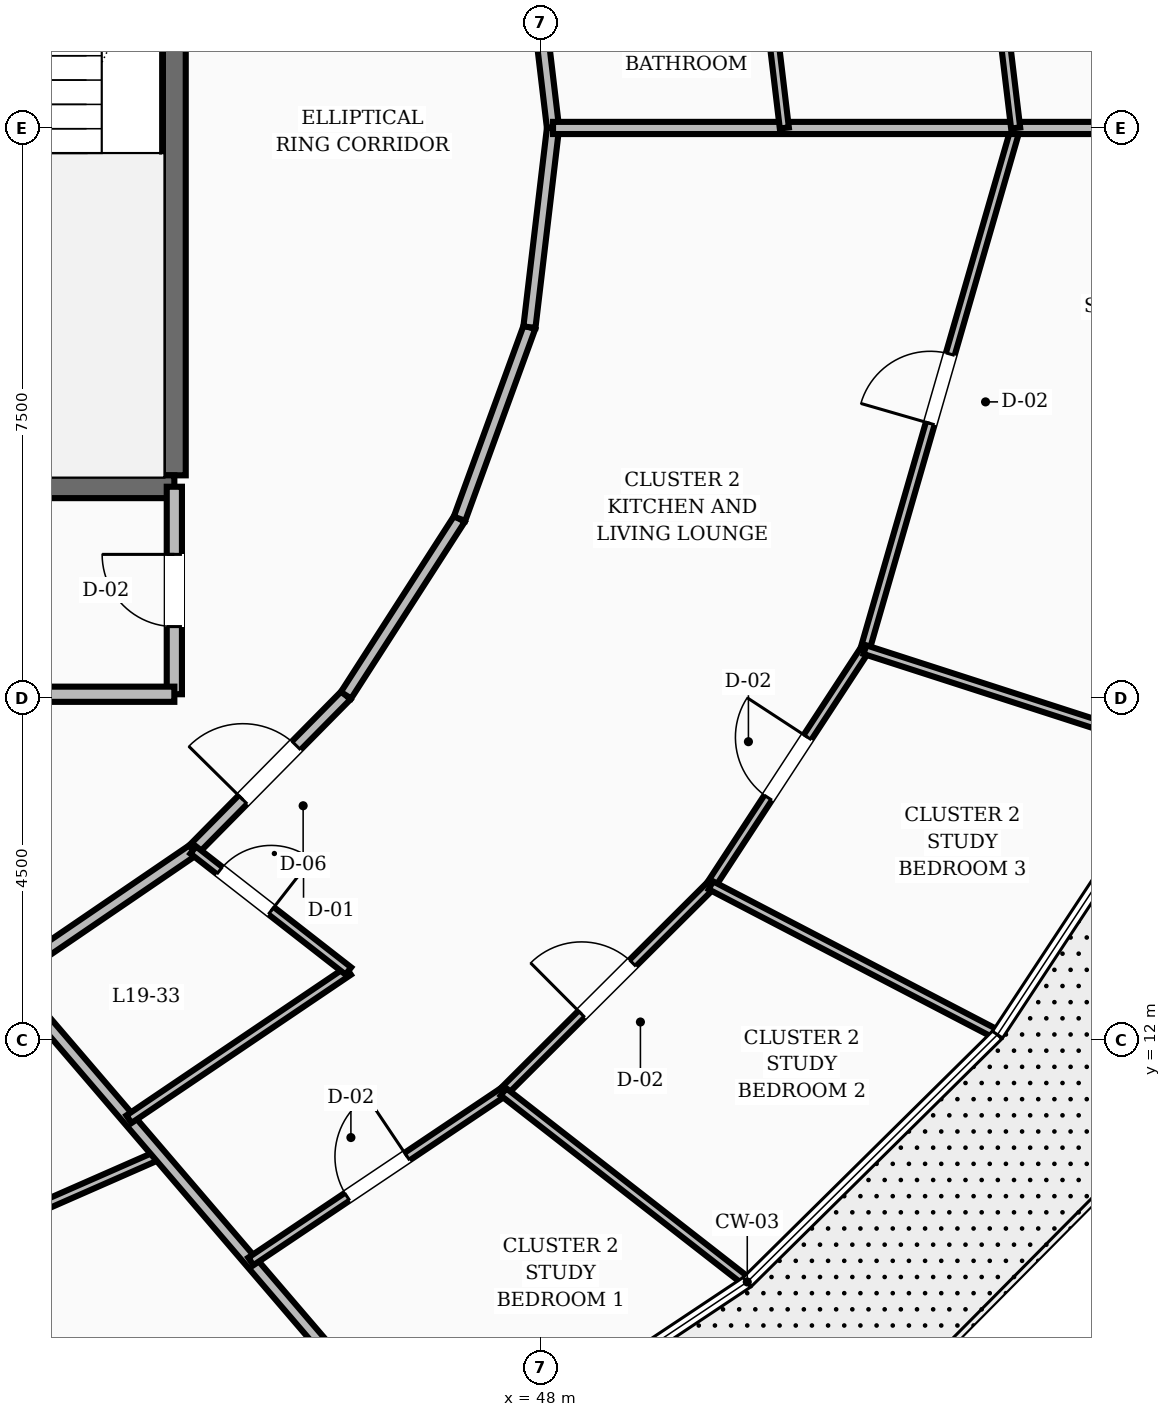
"""IFC4 building model, lengths in metres.
Left out: names, types, materials, properties, quantities, classifications, styles, units other than length and angle.
Written with IfcOpenShell. Run it as: python <this file> out.ifc"""

import sys

from ifc_helpers import new_model, si_unit, direction, frame, frame_2d, origin, place, context, subcontext, project, spatial, rectangle, extrude, element, fill, save


model = new_model("IFC4")
c1 = context("Model", 3, precision=1e-05, world=origin(), true_north=direction((0.0, 1.0)))
c2 = subcontext(c1, "Body", "Model", "MODEL_VIEW")
j1 = project(units=[si_unit("LENGTHUNIT", "METRE"), si_unit("PLANEANGLEUNIT", "RADIAN")], contexts=[c1])
p1 = place(None, origin())
s1 = spatial("IfcSite", under=j1, at=p1, CompositionType="ELEMENT")
p2 = place(p1, origin())
s2 = spatial("IfcBuilding", under=s1, at=p2, CompositionType="ELEMENT")
p3 = place(p2, frame((0.0, 0.0, 77.2)))
s3 = spatial("IfcBuildingStorey", under=s2, at=p3, CompositionType="ELEMENT", Elevation=77.2)
p4 = place(p3, frame((43.18, 19.43, 0.0), z_axis=(0.0, 0.0, 1.0), x_axis=(0.0, 1.0, 0.0)))
e1 = element("IfcWall", 1, at=p4, inside=s3, PredefinedType="SHEAR", context=c2, shape_type="SweptSolid", body=[
    extrude(rectangle(XDim=8.74, YDim=0.3, at=frame_2d((4.37, 0.0))), origin(), (0.0, 0.0, 1.0), 3.6),
])
p5 = place(p3, frame((39.58, 19.28, 0.0), z_axis=(0.0, 0.0, 1.0), x_axis=(1.0, 0.0, 0.0)))
e2 = element("IfcWall", 2, at=p5, inside=s3, PredefinedType="SHEAR", context=c2, shape_type="SweptSolid", body=[
    extrude(rectangle(XDim=3.6, YDim=0.3, at=frame_2d((1.8, 0.0))), origin(), (0.0, 0.0, 1.0), 3.6),
])
p6 = place(p3, frame((43.18, 16.55, 0.0), z_axis=(0.0, 0.0, 1.0), x_axis=(0.0, 1.0, 0.0)))
e3 = element("IfcWall", 3, at=p6, inside=s3, PredefinedType="SOLIDWALL", context=c2, shape_type="SweptSolid", body=[
    extrude(rectangle(XDim=2.73, YDim=0.2, at=frame_2d((1.365, 0.0))), origin(), (0.0, 0.0, 1.0), 2.71),
])
p7 = place(p6, frame((0.89, 0.0, 0.0)))
e4 = element("IfcOpeningElement", 4, at=p7, cuts=e3, PredefinedType="OPENING", context=c2, shape_type="SweptSolid", body=[
    extrude(rectangle(XDim=0.95, YDim=2.1, at=frame_2d((0.475, 1.05))), frame((0.0, 0.11, 0.0), z_axis=(0.0, -1.0, 0.0), x_axis=(1.0, 0.0, 0.0)), (0.0, 0.0, 1.0), 0.22),
])
p8 = place(p3, frame((39.2, 16.55, 0.0), z_axis=(0.0, 0.0, 1.0), x_axis=(1.0, 0.0, 0.0)))
e5 = element("IfcWall", 5, at=p8, inside=s3, PredefinedType="SOLIDWALL", context=c2, shape_type="SweptSolid", body=[
    extrude(rectangle(XDim=3.98, YDim=0.2, at=frame_2d((1.99, 0.0))), origin(), (0.0, 0.0, 1.0), 2.71),
])
p9 = place(p3, frame((48.162, 24.0, 0.0), z_axis=(0.0, 0.0, 1.0), x_axis=(-0.117667763342, 0.993053018459, 0.0)))
e6 = element("IfcWall", 6, at=p9, inside=s3, PredefinedType="SOLIDWALL", context=c2, shape_type="SweptSolid", body=[
    extrude(rectangle(XDim=2.639, YDim=0.16, at=frame_2d((1.32, 0.0))), origin(), (0.0, 0.0, 1.0), 2.71),
])
p10 = place(p3, frame((40.979, 12.83, 0.0), z_axis=(0.0, 0.0, 1.0), x_axis=(0.826112340767, 0.563505457323, 0.0)))
e7 = element("IfcWall", 7, at=p10, inside=s3, PredefinedType="SOLIDWALL", context=c2, shape_type="SweptSolid", body=[
    extrude(rectangle(XDim=2.965, YDim=0.16, at=frame_2d((1.482, 0.0))), origin(), (0.0, 0.0, 1.0), 2.71),
])
p11 = place(p3, frame((43.428, 14.501, 0.0), z_axis=(0.0, 0.0, 1.0), x_axis=(0.702569520063, 0.711615113301, 0.0)))
e8 = element("IfcWall", 8, at=p11, inside=s3, PredefinedType="SOLIDWALL", context=c2, shape_type="SweptSolid", body=[
    extrude(rectangle(XDim=2.861, YDim=0.16, at=frame_2d((1.43, 0.0))), origin(), (0.0, 0.0, 1.0), 2.71),
])
p12 = place(p11, frame((0.93, 0.0, 0.0)))
e9 = element("IfcOpeningElement", 9, at=p12, cuts=e8, PredefinedType="OPENING", context=c2, shape_type="SweptSolid", body=[
    extrude(rectangle(XDim=1.0, YDim=2.1, at=frame_2d((0.5, 1.05))), frame((0.0, 0.09, 0.0), z_axis=(0.0, -1.0, 0.0), x_axis=(1.0, 0.0, 0.0)), (0.0, 0.0, 1.0), 0.18),
])
p13 = place(p3, frame((45.438, 16.537, 0.0), z_axis=(0.0, 0.0, 1.0), x_axis=(0.540891657444, 0.841092274907, 0.0)))
e10 = element("IfcWall", 10, at=p13, inside=s3, PredefinedType="SOLIDWALL", context=c2, shape_type="SweptSolid", body=[
    extrude(rectangle(XDim=2.761, YDim=0.16, at=frame_2d((1.38, 0.0))), origin(), (0.0, 0.0, 1.0), 2.71),
])
p14 = place(p3, frame((46.932, 18.859, 0.0), z_axis=(0.0, 0.0, 1.0), x_axis=(0.342882618672, 0.939378257047, 0.0)))
e11 = element("IfcWall", 11, at=p14, inside=s3, PredefinedType="SOLIDWALL", context=c2, shape_type="SweptSolid", body=[
    extrude(rectangle(XDim=2.683, YDim=0.16, at=frame_2d((1.341, 0.0))), origin(), (0.0, 0.0, 1.0), 2.71),
])
p15 = place(p3, frame((47.852, 21.379, 0.0), z_axis=(0.0, 0.0, 1.0), x_axis=(0.117667763342, 0.993053018459, 0.0)))
e12 = element("IfcWall", 12, at=p15, inside=s3, PredefinedType="SOLIDWALL", context=c2, shape_type="SweptSolid", body=[
    extrude(rectangle(XDim=2.639, YDim=0.16, at=frame_2d((1.32, 0.0))), origin(), (0.0, 0.0, 1.0), 2.71),
])
p16 = place(p3, frame((39.566, 8.99, 0.0), z_axis=(0.0, 0.0, 1.0), x_axis=(0.915580022578, 0.402135825631, 0.0)))
e13 = element("IfcWall", 13, at=p16, inside=s3, PredefinedType="PARTITIONING", context=c2, shape_type="SweptSolid", body=[
    extrude(rectangle(XDim=3.733, YDim=0.12, at=frame_2d((1.867, 0.0))), origin(), (0.0, 0.0, 1.0), 2.71),
])
p17 = place(p3, frame((40.979, 12.83, 0.0), z_axis=(0.0, 0.0, 1.0), x_axis=(0.650772992722, -0.759272356894, 0.0)))
e14 = element("IfcWall", 14, at=p17, inside=s3, PredefinedType="SOLIDWALL", context=c2, shape_type="SweptSolid", body=[
    extrude(rectangle(XDim=8.751, YDim=0.16, at=frame_2d((4.375, 0.0))), origin(), (0.0, 0.0, 1.0), 2.71),
])
p18 = place(p3, frame((42.583, 10.959, 0.0), z_axis=(0.0, 0.0, 1.0), x_axis=(0.828573152584, 0.559880818404, 0.0)))
e15 = element("IfcWall", 15, at=p18, inside=s3, PredefinedType="PARTITIONING", context=c2, shape_type="SweptSolid", body=[
    extrude(rectangle(XDim=3.484, YDim=0.12, at=frame_2d((1.742, 0.0))), origin(), (0.0, 0.0, 1.0), 2.71),
])
p19 = place(p3, frame((43.428, 14.501, 0.0), z_axis=(0.0, 0.0, 1.0), x_axis=(0.788630382034, -0.614867563409, 0.0)))
e16 = element("IfcWall", 16, at=p19, inside=s3, PredefinedType="PARTITIONING", context=c2, shape_type="SweptSolid", body=[
    extrude(rectangle(XDim=2.588, YDim=0.12, at=frame_2d((1.294, 0.0))), origin(), (0.0, 0.0, 1.0), 2.71),
])
p20 = place(p19, frame((0.44, 0.0, 0.0)))
e17 = element("IfcOpeningElement", 17, at=p20, cuts=e16, PredefinedType="OPENING", context=c2, shape_type="SweptSolid", body=[
    extrude(rectangle(XDim=0.86, YDim=2.1, at=frame_2d((0.43, 1.05))), frame((0.0, 0.07, 0.0), z_axis=(0.0, -1.0, 0.0), x_axis=(1.0, 0.0, 0.0)), (0.0, 0.0, 1.0), 0.14),
])
p21 = place(p3, frame((44.186, 9.088, 0.0), z_axis=(0.0, 0.0, 1.0), x_axis=(0.83037634004, 0.557202955755, 0.0)))
e18 = element("IfcWall", 18, at=p21, inside=s3, PredefinedType="PARTITIONING", context=c2, shape_type="SweptSolid", body=[
    extrude(rectangle(XDim=4.003, YDim=0.12, at=frame_2d((2.001, 0.0))), origin(), (0.0, 0.0, 1.0), 2.71),
])
p22 = place(p21, frame((1.527, 0.0, 0.0)))
e19 = element("IfcOpeningElement", 19, at=p22, cuts=e18, PredefinedType="OPENING", context=c2, shape_type="SweptSolid", body=[
    extrude(rectangle(XDim=0.95, YDim=2.1, at=frame_2d((0.475, 1.05))), frame((0.0, 0.07, 0.0), z_axis=(0.0, -1.0, 0.0), x_axis=(1.0, 0.0, 0.0)), (0.0, 0.0, 1.0), 0.14),
])
p23 = place(p3, frame((47.51, 11.318, 0.0), z_axis=(0.0, 0.0, 1.0), x_axis=(0.708405354772, 0.70580581843, 0.0)))
e20 = element("IfcWall", 20, at=p23, inside=s3, PredefinedType="PARTITIONING", context=c2, shape_type="SweptSolid", body=[
    extrude(rectangle(XDim=3.851, YDim=0.12, at=frame_2d((1.925, 0.0))), origin(), (0.0, 0.0, 1.0), 2.71),
])
p24 = place(p23, frame((1.45, 0.0, 0.0)))
e21 = element("IfcOpeningElement", 21, at=p24, cuts=e20, PredefinedType="OPENING", context=c2, shape_type="SweptSolid", body=[
    extrude(rectangle(XDim=0.95, YDim=2.1, at=frame_2d((0.475, 1.05))), frame((0.0, 0.07, 0.0), z_axis=(0.0, -1.0, 0.0), x_axis=(1.0, 0.0, 0.0)), (0.0, 0.0, 1.0), 0.14),
])
p25 = place(p3, frame((47.51, 11.318, 0.0), z_axis=(0.0, 0.0, 1.0), x_axis=(0.788634929873, -0.614861730297, 0.0)))
e22 = element("IfcWall", 22, at=p25, inside=s3, PredefinedType="PARTITIONING", context=c2, shape_type="SweptSolid", body=[
    extrude(rectangle(XDim=4.017, YDim=0.12, at=frame_2d((2.008, 0.0))), origin(), (0.0, 0.0, 1.0), 2.71),
])
p26 = place(p3, frame((50.238, 14.036, 0.0), z_axis=(0.0, 0.0, 1.0), x_axis=(0.547210297377, 0.836995155568, 0.0)))
e23 = element("IfcWall", 23, at=p26, inside=s3, PredefinedType="PARTITIONING", context=c2, shape_type="SweptSolid", body=[
    extrude(rectangle(XDim=3.704, YDim=0.12, at=frame_2d((1.852, 0.0))), origin(), (0.0, 0.0, 1.0), 2.71),
])
p27 = place(p26, frame((1.377, 0.0, 0.0)))
e24 = element("IfcOpeningElement", 24, at=p27, cuts=e23, PredefinedType="OPENING", context=c2, shape_type="SweptSolid", body=[
    extrude(rectangle(XDim=0.95, YDim=2.1, at=frame_2d((0.475, 1.05))), frame((0.0, 0.07, 0.0), z_axis=(0.0, -1.0, 0.0), x_axis=(1.0, 0.0, 0.0)), (0.0, 0.0, 1.0), 0.14),
])
p28 = place(p3, frame((50.238, 14.036, 0.0), z_axis=(0.0, 0.0, 1.0), x_axis=(0.886891273175, -0.461978213303, 0.0)))
e25 = element("IfcWall", 25, at=p28, inside=s3, PredefinedType="PARTITIONING", context=c2, shape_type="SweptSolid", body=[
    extrude(rectangle(XDim=4.202, YDim=0.12, at=frame_2d((2.101, 0.0))), origin(), (0.0, 0.0, 1.0), 2.71),
])
p29 = place(p3, frame((52.265, 17.137, 0.0), z_axis=(0.0, 0.0, 1.0), x_axis=(0.277595025379, 0.960698184595, 0.0)))
e26 = element("IfcWall", 26, at=p29, inside=s3, PredefinedType="PARTITIONING", context=c2, shape_type="SweptSolid", body=[
    extrude(rectangle(XDim=7.144, YDim=0.12, at=frame_2d((3.572, 0.0))), origin(), (0.0, 0.0, 1.0), 2.71),
])
p30 = place(p29, frame((3.097, 0.0, 0.0)))
e27 = element("IfcOpeningElement", 27, at=p30, cuts=e26, PredefinedType="OPENING", context=c2, shape_type="SweptSolid", body=[
    extrude(rectangle(XDim=0.95, YDim=2.1, at=frame_2d((0.475, 1.05))), frame((0.0, 0.07, 0.0), z_axis=(0.0, -1.0, 0.0), x_axis=(1.0, 0.0, 0.0)), (0.0, 0.0, 1.0), 0.14),
])
p31 = place(p3, frame((52.265, 17.137, 0.0), z_axis=(0.0, 0.0, 1.0), x_axis=(0.951624541118, -0.307263295467, 0.0)))
e28 = element("IfcWall", 28, at=p31, inside=s3, PredefinedType="PARTITIONING", context=c2, shape_type="SweptSolid", body=[
    extrude(rectangle(XDim=4.354, YDim=0.12, at=frame_2d((2.177, 0.0))), origin(), (0.0, 0.0, 1.0), 2.71),
])
p32 = place(p3, frame((48.162, 24.0, 0.0), z_axis=(0.0, 0.0, 1.0), x_axis=(1.0, 0.0, 0.0)))
e29 = element("IfcWall", 29, at=p32, inside=s3, PredefinedType="SOLIDWALL", context=c2, shape_type="SweptSolid", body=[
    extrude(rectangle(XDim=10.819, YDim=0.16, at=frame_2d((5.409, 0.0))), origin(), (0.0, 0.0, 1.0), 2.71),
])
p33 = place(p3, frame((51.205, 24.0, 0.0), z_axis=(0.0, 0.0, 1.0), x_axis=(-0.118529643461, 0.992950514185, 0.0)))
e30 = element("IfcWall", 30, at=p33, inside=s3, PredefinedType="PARTITIONING", context=c2, shape_type="SweptSolid", body=[
    extrude(rectangle(XDim=3.112, YDim=0.12, at=frame_2d((1.556, 0.0))), origin(), (0.0, 0.0, 1.0), 2.71),
])
p34 = place(p3, frame((54.248, 24.0, 0.0), z_axis=(0.0, 0.0, 1.0), x_axis=(-0.119223081784, 0.99286749205, 0.0)))
e31 = element("IfcWall", 31, at=p34, inside=s3, PredefinedType="PARTITIONING", context=c2, shape_type="SweptSolid", body=[
    extrude(rectangle(XDim=3.586, YDim=0.12, at=frame_2d((1.793, 0.0))), origin(), (0.0, 0.0, 1.0), 2.71),
])
p35 = place(p34, frame((1.318, 0.0, 0.0)))
e32 = element("IfcOpeningElement", 32, at=p35, cuts=e31, PredefinedType="OPENING", context=c2, shape_type="SweptSolid", body=[
    extrude(rectangle(XDim=0.95, YDim=2.1, at=frame_2d((0.475, 1.05))), frame((0.0, 0.07, 0.0), z_axis=(0.0, -1.0, 0.0), x_axis=(1.0, 0.0, 0.0)), (0.0, 0.0, 1.0), 0.14),
])
p36 = place(p7, origin())
e33 = element("IfcDoor", 33, at=p36, inside=s3, OperationType="SINGLE_SWING_RIGHT", PredefinedType="DOOR", context=c2, shape_type="SweptSolid", body=[
    extrude(rectangle(XDim=0.95, YDim=2.1, at=frame_2d((0.475, 1.05))), frame((0.0, 0.025, 0.0), z_axis=(0.0, -1.0, 0.0), x_axis=(1.0, 0.0, 0.0)), (0.0, 0.0, 1.0), 0.05),
])
fill(e4, e33)
p37 = place(p20, origin())
e34 = element("IfcDoor", 34, at=p37, inside=s3, OperationType="SINGLE_SWING_RIGHT", PredefinedType="DOOR", context=c2, shape_type="SweptSolid", body=[
    extrude(rectangle(XDim=0.86, YDim=2.1, at=frame_2d((0.43, 1.05))), frame((0.0, 0.025, 0.0), z_axis=(0.0, -1.0, 0.0), x_axis=(1.0, 0.0, 0.0)), (0.0, 0.0, 1.0), 0.05),
])
fill(e17, e34)
p38 = place(p12, origin())
e35 = element("IfcDoor", 35, at=p38, inside=s3, OperationType="SINGLE_SWING_LEFT", PredefinedType="DOOR", context=c2, shape_type="SweptSolid", body=[
    extrude(rectangle(XDim=1.0, YDim=2.1, at=frame_2d((0.5, 1.05))), frame((0.0, 0.025, 0.0), z_axis=(0.0, -1.0, 0.0), x_axis=(1.0, 0.0, 0.0)), (0.0, 0.0, 1.0), 0.05),
])
fill(e9, e35)
p39 = place(p22, origin())
e36 = element("IfcDoor", 36, at=p39, inside=s3, OperationType="SINGLE_SWING_RIGHT", PredefinedType="DOOR", context=c2, shape_type="SweptSolid", body=[
    extrude(rectangle(XDim=0.95, YDim=2.1, at=frame_2d((0.475, 1.05))), frame((0.0, 0.025, 0.0), z_axis=(0.0, -1.0, 0.0), x_axis=(1.0, 0.0, 0.0)), (0.0, 0.0, 1.0), 0.05),
])
fill(e19, e36)
p40 = place(p24, origin())
e37 = element("IfcDoor", 37, at=p40, inside=s3, OperationType="SINGLE_SWING_LEFT", PredefinedType="DOOR", context=c2, shape_type="SweptSolid", body=[
    extrude(rectangle(XDim=0.95, YDim=2.1, at=frame_2d((0.475, 1.05))), frame((0.0, 0.025, 0.0), z_axis=(0.0, -1.0, 0.0), x_axis=(1.0, 0.0, 0.0)), (0.0, 0.0, 1.0), 0.05),
])
fill(e21, e37)
p41 = place(p27, origin())
e38 = element("IfcDoor", 38, at=p41, inside=s3, OperationType="SINGLE_SWING_RIGHT", PredefinedType="DOOR", context=c2, shape_type="SweptSolid", body=[
    extrude(rectangle(XDim=0.95, YDim=2.1, at=frame_2d((0.475, 1.05))), frame((0.0, 0.025, 0.0), z_axis=(0.0, -1.0, 0.0), x_axis=(1.0, 0.0, 0.0)), (0.0, 0.0, 1.0), 0.05),
])
fill(e24, e38)
p42 = place(p30, origin())
e39 = element("IfcDoor", 39, at=p42, inside=s3, OperationType="SINGLE_SWING_LEFT", PredefinedType="DOOR", context=c2, shape_type="SweptSolid", body=[
    extrude(rectangle(XDim=0.95, YDim=2.1, at=frame_2d((0.475, 1.05))), frame((0.0, 0.025, 0.0), z_axis=(0.0, -1.0, 0.0), x_axis=(1.0, 0.0, 0.0)), (0.0, 0.0, 1.0), 0.05),
])
fill(e27, e39)
save(model, sys.argv[1])
